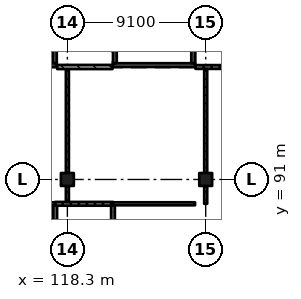
"""IFC4 building model, lengths in metres.
Left out: names, types, materials, properties, quantities, classifications, styles, units other than length and angle.
Written with IfcOpenShell. Run it as: python <this file> out.ifc"""

import sys

from ifc_helpers import new_model, si_unit, direction, frame, frame_2d, origin, origin_2d, place, context, subcontext, project, spatial, rectangle, extrude, element, fill, save


model = new_model("IFC4")
c1 = context("Model", 3, precision=1e-05, world=origin(), true_north=direction((0.0, 1.0)))
c2 = subcontext(c1, "Body", "Model", "MODEL_VIEW")
j1 = project(units=[si_unit("LENGTHUNIT", "METRE"), si_unit("PLANEANGLEUNIT", "RADIAN")], contexts=[c1])
p1 = place(None, origin())
s1 = spatial("IfcSite", under=j1, at=p1, CompositionType="ELEMENT")
p2 = place(p1, origin())
s2 = spatial("IfcBuilding", under=s1, at=p2, CompositionType="ELEMENT")
p3 = place(p2, frame((0.0, 0.0, 6.37)))
s3 = spatial("IfcBuildingStorey", under=s2, at=p3, CompositionType="ELEMENT", Elevation=6.37)
for number, where, z_axis, x_axis in (
    (1, (118.3, 91.0, 0.0), (0.0, 0.0, 1.0), (1.0, 0.0, 0.0)),
    (2, (127.4, 91.0, 0.0), (0.0, 0.0, 1.0), (1.0, 0.0, 0.0)),
):
    element("IfcColumn", number, at=place(p3, frame(where, z_axis=z_axis, x_axis=x_axis)), inside=s3, PredefinedType="COLUMN", context=c2, shape_type="SweptSolid", body=[
        extrude(rectangle(XDim=0.85, YDim=0.85, at=origin_2d()), origin(), (0.0, 0.0, 1.0), 4.55),
    ])
p4 = place(p3, frame((126.7, 98.525, 0.0), z_axis=(0.0, 0.0, 1.0), x_axis=(-1.0, 0.0, 0.0)))
e3 = element("IfcWall", 3, at=p4, inside=s3, PredefinedType="SHEAR", context=c2, shape_type="SweptSolid", body=[
    extrude(rectangle(XDim=5.4, YDim=0.25, at=frame_2d((2.7, 0.0))), origin(), (0.0, 0.0, 1.0), 4.55),
])
p5 = place(p4, frame((1.5, 0.0, 0.0)))
e4 = element("IfcOpeningElement", 4, at=p5, cuts=e3, PredefinedType="OPENING", context=c2, shape_type="SweptSolid", body=[
    extrude(rectangle(XDim=2.4, YDim=2.1, at=frame_2d((1.2, 1.05))), frame((0.0, 0.135, 0.0), z_axis=(0.0, -1.0, 0.0), x_axis=(1.0, 0.0, 0.0)), (0.0, 0.0, 1.0), 0.27),
])
for number, where, z_axis, x_axis in (
    (5, (121.425, 108.25, 0.0), (0.0, 0.0, 1.0), (0.0, -1.0, 0.0)),
    (6, (126.575, 108.25, 0.0), (0.0, 0.0, 1.0), (0.0, -1.0, 0.0)),
):
    element("IfcWall", number, at=place(p3, frame(where, z_axis=z_axis, x_axis=x_axis)), inside=s3, PredefinedType="SHEAR", context=c2, shape_type="SweptSolid", body=[
        extrude(rectangle(XDim=9.6, YDim=0.25, at=frame_2d((4.8, 0.0))), origin(), (0.0, 0.0, 1.0), 4.55),
    ])
p6 = place(p3, frame((117.6, 98.525, 0.0), z_axis=(0.0, 0.0, 1.0), x_axis=(-1.0, 0.0, 0.0)))
e7 = element("IfcWall", 7, at=p6, inside=s3, PredefinedType="SHEAR", context=c2, shape_type="SweptSolid", body=[
    extrude(rectangle(XDim=5.4, YDim=0.25, at=frame_2d((2.7, 0.0))), origin(), (0.0, 0.0, 1.0), 4.55),
])
p7 = place(p6, frame((1.5, 0.0, 0.0)))
e8 = element("IfcOpeningElement", 8, at=p7, cuts=e7, PredefinedType="OPENING", context=c2, shape_type="SweptSolid", body=[
    extrude(rectangle(XDim=2.4, YDim=2.1, at=frame_2d((1.2, 1.05))), frame((0.0, 0.135, 0.0), z_axis=(0.0, -1.0, 0.0), x_axis=(1.0, 0.0, 0.0)), (0.0, 0.0, 1.0), 0.27),
])
p8 = place(p3, frame((117.475, 108.25, 0.0), z_axis=(0.0, 0.0, 1.0), x_axis=(0.0, -1.0, 0.0)))
e9 = element("IfcWall", 9, at=p8, inside=s3, PredefinedType="SHEAR", context=c2, shape_type="SweptSolid", body=[
    extrude(rectangle(XDim=9.6, YDim=0.25, at=frame_2d((4.8, 0.0))), origin(), (0.0, 0.0, 1.0), 4.55),
])
p9 = place(p3, frame((117.5, 86.43, 0.0), z_axis=(0.0, 0.0, 1.0), x_axis=(0.0, 1.0, 0.0)))
e10 = element("IfcWall", 10, at=p9, inside=s3, PredefinedType="SOLIDWALL", context=c2, shape_type="SweptSolid", body=[
    extrude(rectangle(XDim=2.845, YDim=0.25, at=frame_2d((1.422, 0.0))), origin(), (0.0, 0.0, 1.0), 4.25),
])
p10 = place(p3, frame((117.5, 89.4, 0.0), z_axis=(0.0, 0.0, 1.0), x_axis=(-1.0, 0.0, 0.0)))
e11 = element("IfcWall", 11, at=p10, inside=s3, PredefinedType="PARTITIONING", context=c2, shape_type="SweptSolid", body=[
    extrude(rectangle(XDim=5.3, YDim=0.2, at=frame_2d((2.65, 0.0))), origin(), (0.0, 0.0, 1.0), 4.25),
])
p11 = place(p10, frame((1.75, 0.0, 0.0)))
e12 = element("IfcOpeningElement", 12, at=p11, cuts=e11, PredefinedType="OPENING", context=c2, shape_type="SweptSolid", body=[
    extrude(rectangle(XDim=1.8, YDim=2.4, at=frame_2d((0.9, 1.2))), frame((0.0, 0.11, 0.0), z_axis=(0.0, -1.0, 0.0), x_axis=(1.0, 0.0, 0.0)), (0.0, 0.0, 1.0), 0.22),
])
p12 = place(p3, frame((117.63, 98.4, 0.0), z_axis=(0.0, 0.0, 1.0), x_axis=(1.0, 0.0, 0.0)))
e13 = element("IfcWall", 13, at=p12, inside=s3, PredefinedType="SOLIDWALL", context=c2, shape_type="SweptSolid", body=[
    extrude(rectangle(XDim=3.64, YDim=0.275, at=frame_2d((1.82, 0.0))), origin(), (0.0, 0.0, 1.0), 4.25),
])
p13 = place(p12, frame((1.52, 0.0, 0.0)))
e14 = element("IfcOpeningElement", 14, at=p13, cuts=e13, PredefinedType="OPENING", context=c2, shape_type="SweptSolid", body=[
    extrude(rectangle(XDim=1.2, YDim=2.4, at=frame_2d((0.6, 1.2))), frame((0.0, 0.147, 0.0), z_axis=(0.0, -1.0, 0.0), x_axis=(1.0, 0.0, 0.0)), (0.0, 0.0, 1.0), 0.295),
])
p14 = place(p3, frame((117.5, 89.4, 0.0), z_axis=(0.0, 0.0, 1.0), x_axis=(1.0, 0.0, 0.0)))
e15 = element("IfcWall", 15, at=p14, inside=s3, PredefinedType="SOLIDWALL", context=c2, shape_type="SweptSolid", body=[
    extrude(rectangle(XDim=3.8, YDim=0.25, at=frame_2d((1.9, 0.0))), origin(), (0.0, 0.0, 1.0), 4.25),
])
p15 = place(p14, frame((1.85, 0.0, 0.0)))
e16 = element("IfcOpeningElement", 16, at=p15, cuts=e15, PredefinedType="OPENING", context=c2, shape_type="SweptSolid", body=[
    extrude(rectangle(XDim=0.8, YDim=2.1, at=frame_2d((0.4, 1.05))), frame((0.0, 0.135, 0.0), z_axis=(0.0, -1.0, 0.0), x_axis=(1.0, 0.0, 0.0)), (0.0, 0.0, 1.0), 0.27),
])
p16 = place(p3, frame((118.3, 89.525, 0.0), z_axis=(0.0, 0.0, 1.0), x_axis=(0.0, 1.0, 0.0)))
e17 = element("IfcWall", 17, at=p16, inside=s3, PredefinedType="PARTITIONING", context=c2, shape_type="SweptSolid", body=[
    extrude(rectangle(XDim=1.05, YDim=0.2, at=frame_2d((0.525, 0.0))), origin(), (0.0, 0.0, 1.0), 3.55),
])
p17 = place(p3, frame((118.3, 91.425, 0.0), z_axis=(0.0, 0.0, 1.0), x_axis=(0.0, 1.0, 0.0)))
e18 = element("IfcWall", 18, at=p17, inside=s3, PredefinedType="PARTITIONING", context=c2, shape_type="SweptSolid", body=[
    extrude(rectangle(XDim=6.837, YDim=0.2, at=frame_2d((3.419, 0.0))), origin(), (0.0, 0.0, 1.0), 3.55),
])
p18 = place(p17, frame((0.85, 0.0, 0.0)))
e19 = element("IfcOpeningElement", 19, at=p18, cuts=e18, PredefinedType="OPENING", context=c2, shape_type="SweptSolid", body=[
    extrude(rectangle(XDim=1.8, YDim=2.4, at=frame_2d((0.9, 1.2))), frame((0.0, 0.11, 0.0), z_axis=(0.0, -1.0, 0.0), x_axis=(1.0, 0.0, 0.0)), (0.0, 0.0, 1.0), 0.22),
])
p19 = place(p17, frame((4.25, 0.0, 0.0)))
e20 = element("IfcOpeningElement", 20, at=p19, cuts=e18, PredefinedType="OPENING", context=c2, shape_type="SweptSolid", body=[
    extrude(rectangle(XDim=1.8, YDim=2.4, at=frame_2d((0.9, 1.2))), frame((0.0, 0.11, 0.0), z_axis=(0.0, -1.0, 0.0), x_axis=(1.0, 0.0, 0.0)), (0.0, 0.0, 1.0), 0.22),
])
p20 = place(p3, frame((121.3, 89.275, 0.0), z_axis=(0.0, 0.0, 1.0), x_axis=(0.0, -1.0, 0.0)))
e21 = element("IfcWall", 21, at=p20, inside=s3, PredefinedType="SOLIDWALL", context=c2, shape_type="SweptSolid", body=[
    extrude(rectangle(XDim=2.75, YDim=0.25, at=frame_2d((1.375, 0.0))), origin(), (0.0, 0.0, 1.0), 4.25),
])
p21 = place(p3, frame((126.7, 89.4, 0.0), z_axis=(0.0, 0.0, 1.0), x_axis=(-1.0, 0.0, 0.0)))
e22 = element("IfcWall", 22, at=p21, inside=s3, PredefinedType="PARTITIONING", context=c2, shape_type="SweptSolid", body=[
    extrude(rectangle(XDim=5.4, YDim=0.2, at=frame_2d((2.7, 0.0))), origin(), (0.0, 0.0, 1.0), 4.25),
])
p22 = place(p21, frame((1.85, 0.0, 0.0)))
e23 = element("IfcOpeningElement", 23, at=p22, cuts=e22, PredefinedType="OPENING", context=c2, shape_type="SweptSolid", body=[
    extrude(rectangle(XDim=1.8, YDim=2.4, at=frame_2d((0.9, 1.2))), frame((0.0, 0.11, 0.0), z_axis=(0.0, -1.0, 0.0), x_axis=(1.0, 0.0, 0.0)), (0.0, 0.0, 1.0), 0.22),
])
p23 = place(p3, frame((126.73, 98.4, 0.0), z_axis=(0.0, 0.0, 1.0), x_axis=(1.0, 0.0, 0.0)))
e24 = element("IfcWall", 24, at=p23, inside=s3, PredefinedType="SOLIDWALL", context=c2, shape_type="SweptSolid", body=[
    extrude(rectangle(XDim=3.64, YDim=0.25, at=frame_2d((1.82, 0.0))), origin(), (0.0, 0.0, 1.0), 4.25),
])
p24 = place(p23, frame((1.72, 0.0, 0.0)))
e25 = element("IfcOpeningElement", 25, at=p24, cuts=e24, PredefinedType="OPENING", context=c2, shape_type="SweptSolid", body=[
    extrude(rectangle(XDim=0.8, YDim=2.1, at=frame_2d((0.4, 1.05))), frame((0.0, 0.135, 0.0), z_axis=(0.0, -1.0, 0.0), x_axis=(1.0, 0.0, 0.0)), (0.0, 0.0, 1.0), 0.27),
])
p25 = place(p3, frame((127.4, 89.4, 0.0), z_axis=(0.0, 0.0, 1.0), x_axis=(0.0, 1.0, 0.0)))
e26 = element("IfcWall", 26, at=p25, inside=s3, PredefinedType="PARTITIONING", context=c2, shape_type="SweptSolid", body=[
    extrude(rectangle(XDim=1.175, YDim=0.2, at=frame_2d((0.587, 0.0))), origin(), (0.0, 0.0, 1.0), 3.55),
])
p26 = place(p3, frame((127.4, 91.425, 0.0), z_axis=(0.0, 0.0, 1.0), x_axis=(0.0, 1.0, 0.0)))
e27 = element("IfcWall", 27, at=p26, inside=s3, PredefinedType="PARTITIONING", context=c2, shape_type="SweptSolid", body=[
    extrude(rectangle(XDim=6.85, YDim=0.2, at=frame_2d((3.425, 0.0))), origin(), (0.0, 0.0, 1.0), 3.55),
])
p27 = place(p26, frame((0.85, 0.0, 0.0)))
e28 = element("IfcOpeningElement", 28, at=p27, cuts=e27, PredefinedType="OPENING", context=c2, shape_type="SweptSolid", body=[
    extrude(rectangle(XDim=1.8, YDim=2.4, at=frame_2d((0.9, 1.2))), frame((0.0, 0.11, 0.0), z_axis=(0.0, -1.0, 0.0), x_axis=(1.0, 0.0, 0.0)), (0.0, 0.0, 1.0), 0.22),
])
p28 = place(p26, frame((4.25, 0.0, 0.0)))
e29 = element("IfcOpeningElement", 29, at=p28, cuts=e27, PredefinedType="OPENING", context=c2, shape_type="SweptSolid", body=[
    extrude(rectangle(XDim=1.8, YDim=2.4, at=frame_2d((0.9, 1.2))), frame((0.0, 0.11, 0.0), z_axis=(0.0, -1.0, 0.0), x_axis=(1.0, 0.0, 0.0)), (0.0, 0.0, 1.0), 0.22),
])
p29 = place(p15, origin())
e30 = element("IfcDoor", 30, at=p29, inside=s3, OperationType="SINGLE_SWING_LEFT", PredefinedType="DOOR", context=c2, shape_type="SweptSolid", body=[
    extrude(rectangle(XDim=0.8, YDim=2.1, at=frame_2d((0.4, 1.05))), frame((0.0, 0.025, 0.0), z_axis=(0.0, -1.0, 0.0), x_axis=(1.0, 0.0, 0.0)), (0.0, 0.0, 1.0), 0.05),
])
fill(e16, e30)
p30 = place(p13, origin())
e31 = element("IfcDoor", 31, at=p30, inside=s3, OperationType="SINGLE_SWING_RIGHT", PredefinedType="DOOR", context=c2, shape_type="SweptSolid", body=[
    extrude(rectangle(XDim=1.2, YDim=2.4, at=frame_2d((0.6, 1.2))), frame((0.0, 0.025, 0.0), z_axis=(0.0, -1.0, 0.0), x_axis=(1.0, 0.0, 0.0)), (0.0, 0.0, 1.0), 0.05),
])
fill(e14, e31)
p31 = place(p27, origin())
e32 = element("IfcDoor", 32, at=p31, inside=s3, OperationType="DOUBLE_DOOR_SINGLE_SWING", PredefinedType="DOOR", context=c2, shape_type="SweptSolid", body=[
    extrude(rectangle(XDim=1.8, YDim=2.4, at=frame_2d((0.9, 1.2))), frame((0.0, 0.025, 0.0), z_axis=(0.0, -1.0, 0.0), x_axis=(1.0, 0.0, 0.0)), (0.0, 0.0, 1.0), 0.05),
])
fill(e28, e32)
p32 = place(p28, origin())
e33 = element("IfcDoor", 33, at=p32, inside=s3, OperationType="DOUBLE_DOOR_SINGLE_SWING", PredefinedType="DOOR", context=c2, shape_type="SweptSolid", body=[
    extrude(rectangle(XDim=1.8, YDim=2.4, at=frame_2d((0.9, 1.2))), frame((0.0, 0.025, 0.0), z_axis=(0.0, -1.0, 0.0), x_axis=(1.0, 0.0, 0.0)), (0.0, 0.0, 1.0), 0.05),
])
fill(e29, e33)
p33 = place(p18, origin())
e34 = element("IfcDoor", 34, at=p33, inside=s3, OperationType="DOUBLE_DOOR_SINGLE_SWING", PredefinedType="DOOR", context=c2, shape_type="SweptSolid", body=[
    extrude(rectangle(XDim=1.8, YDim=2.4, at=frame_2d((0.9, 1.2))), frame((0.0, 0.025, 0.0), z_axis=(0.0, -1.0, 0.0), x_axis=(1.0, 0.0, 0.0)), (0.0, 0.0, 1.0), 0.05),
])
fill(e19, e34)
p34 = place(p19, origin())
e35 = element("IfcDoor", 35, at=p34, inside=s3, OperationType="DOUBLE_DOOR_SINGLE_SWING", PredefinedType="DOOR", context=c2, shape_type="SweptSolid", body=[
    extrude(rectangle(XDim=1.8, YDim=2.4, at=frame_2d((0.9, 1.2))), frame((0.0, 0.025, 0.0), z_axis=(0.0, -1.0, 0.0), x_axis=(1.0, 0.0, 0.0)), (0.0, 0.0, 1.0), 0.05),
])
fill(e20, e35)
p35 = place(p22, origin())
e36 = element("IfcDoor", 36, at=p35, inside=s3, OperationType="DOUBLE_DOOR_SINGLE_SWING", PredefinedType="DOOR", context=c2, shape_type="SweptSolid", body=[
    extrude(rectangle(XDim=1.8, YDim=2.4, at=frame_2d((0.9, 1.2))), frame((0.0, 0.025, 0.0), z_axis=(0.0, -1.0, 0.0), x_axis=(1.0, 0.0, 0.0)), (0.0, 0.0, 1.0), 0.05),
])
fill(e23, e36)
p36 = place(p5, origin())
e37 = element("IfcDoor", 37, at=p36, inside=s3, OperationType="DOUBLE_DOOR_SINGLE_SWING", PredefinedType="DOOR", context=c2, shape_type="SweptSolid", body=[
    extrude(rectangle(XDim=2.4, YDim=2.1, at=frame_2d((1.2, 1.05))), frame((0.0, 0.025, 0.0), z_axis=(0.0, -1.0, 0.0), x_axis=(1.0, 0.0, 0.0)), (0.0, 0.0, 1.0), 0.05),
])
fill(e4, e37)
save(model, sys.argv[1])
